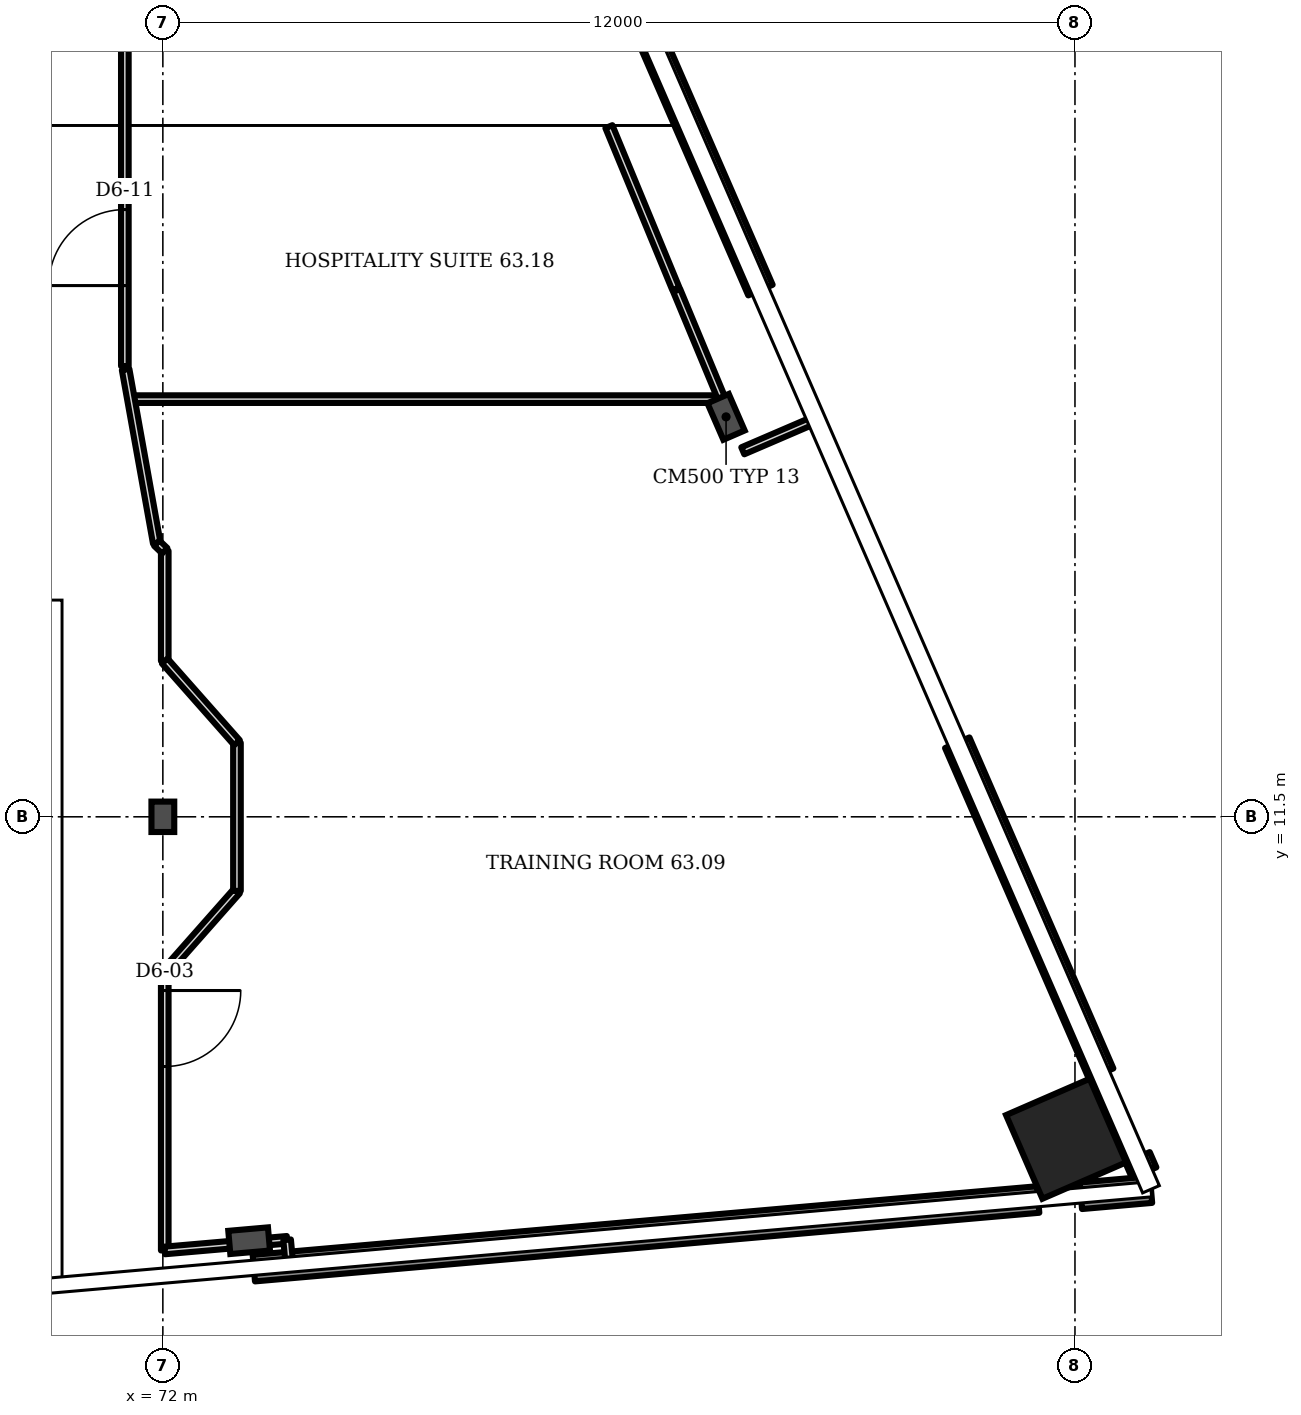
"""IFC4 building model, lengths in metres.
Left out: names, types, materials, properties, quantities, classifications, styles, units other than length and angle.
Written with IfcOpenShell. Run it as: python <this file> out.ifc"""

import sys

from ifc_helpers import new_model, si_unit, direction, frame, frame_2d, origin, origin_2d, place, context, subcontext, project, spatial, rectangle, i_section, extrude, element, fill, save


model = new_model("IFC4")
c1 = context("Model", 3, precision=1e-05, world=origin(), true_north=direction((0.0, 1.0)))
c2 = subcontext(c1, "Body", "Model", "MODEL_VIEW")
j1 = project(units=[si_unit("LENGTHUNIT", "METRE"), si_unit("PLANEANGLEUNIT", "RADIAN")], contexts=[c1])
p1 = place(None, origin())
s1 = spatial("IfcSite", under=j1, at=p1, CompositionType="ELEMENT")
p2 = place(p1, origin())
s2 = spatial("IfcBuilding", under=s1, at=p2, CompositionType="ELEMENT")
p3 = place(p2, frame((0.0, 0.0, 250.3)))
s3 = spatial("IfcBuildingStorey", under=s2, at=p3, CompositionType="ELEMENT", Elevation=250.3)
p4 = place(p3, frame((83.883, 7.265, 0.0), z_axis=(0.0, 0.0, 1.0), x_axis=(-0.398727, 0.917072, 0.0)))
e1 = element("IfcColumn", 1, at=p4, inside=s3, PredefinedType="COLUMN", context=c2, shape_type="SweptSolid", body=[
    extrude(rectangle(XDim=1.2, YDim=1.2, at=origin_2d()), origin(), (0.0, 0.0, 1.0), 3.6),
])
for number, where, z_axis, x_axis in (
    (2, (73.135, 5.923, 0.0), (0.0, 0.0, 1.0), (0.087, -0.996, 0.0)),
    (3, (79.41, 16.762, 0.0), (0.0, 0.0, 1.0), (0.917, 0.399, 0.0)),
):
    element("IfcColumn", number, at=place(p3, frame(where, z_axis=z_axis, x_axis=x_axis)), inside=s3, PredefinedType="COLUMN", context=c2, shape_type="SweptSolid", body=[
        extrude(i_section(OverallWidth=0.306, OverallDepth=0.524, WebThickness=0.021, FlangeThickness=0.04, FilletRadius=0.027, at=origin_2d()), origin(), (0.0, 0.0, 1.0), 3.6),
    ])
p5 = place(p3, frame((72.0, 11.5, 0.0), z_axis=(0.0, 0.0, 1.0), x_axis=(1.0, 0.0, 0.0)))
e4 = element("IfcColumn", 4, at=p5, inside=s3, PredefinedType="COLUMN", context=c2, shape_type="SweptSolid", body=[
    extrude(i_section(OverallWidth=0.3, OverallDepth=0.4, WebThickness=0.013, FlangeThickness=0.024, FilletRadius=0.027, at=origin_2d()), origin(), (0.0, 0.0, 1.0), 3.6),
])
p6 = place(p3, frame((73.197, 5.562, 0.0), z_axis=(0.0, 0.0, 1.0), x_axis=(0.996198, 0.087163, 0.0)))
e5 = element("IfcWall", 5, at=p6, inside=s3, PredefinedType="SOLIDWALL", context=c2, shape_type="SweptSolid", body=[
    extrude(rectangle(XDim=10.358, YDim=0.35, at=frame_2d((5.179, 0.0))), origin(), (0.0, 0.0, 1.0), 1.0),
])
p7 = place(p3, frame((84.078, 6.514, 0.0), z_axis=(0.0, 0.0, 1.0), x_axis=(0.996213, 0.086971, 0.0)))
e6 = element("IfcWall", 6, at=p7, inside=s3, PredefinedType="SOLIDWALL", context=c2, shape_type="SweptSolid", body=[
    extrude(rectangle(XDim=0.926, YDim=0.35, at=frame_2d((0.463, 0.0))), origin(), (0.0, 0.0, 1.0), 1.0),
])
p8 = place(p3, frame((84.91, 6.819, 0.0), z_axis=(0.0, 0.0, 1.0), x_axis=(-0.398359, 0.91723, 0.0)))
e7 = element("IfcWall", 7, at=p8, inside=s3, PredefinedType="SOLIDWALL", context=c2, shape_type="SweptSolid", body=[
    extrude(rectangle(XDim=0.219, YDim=0.35, at=frame_2d((0.109, 0.0))), origin(), (0.0, 0.0, 1.0), 1.0),
])
p9 = place(p3, frame((84.345, 8.12, 0.0), z_axis=(0.0, 0.0, 1.0), x_axis=(-0.398736, 0.917067, 0.0)))
e8 = element("IfcWall", 8, at=p9, inside=s3, PredefinedType="SOLIDWALL", context=c2, shape_type="SweptSolid", body=[
    extrude(rectangle(XDim=4.748, YDim=0.35, at=frame_2d((2.374, 0.0))), origin(), (0.0, 0.0, 1.0), 1.0),
])
p10 = place(p3, frame((79.862, 18.429, 0.0), z_axis=(0.0, 0.0, 1.0), x_axis=(-0.398755, 0.91706, 0.0)))
e9 = element("IfcWall", 9, at=p10, inside=s3, PredefinedType="SOLIDWALL", context=c2, shape_type="SweptSolid", body=[
    extrude(rectangle(XDim=6.374, YDim=0.35, at=frame_2d((3.187, 0.0))), origin(), (0.0, 0.0, 1.0), 1.0),
])
p11 = place(p3, frame((71.5, 17.43, 0.0), z_axis=(0.0, 0.0, 1.0), x_axis=(0.0, 1.0, 0.0)))
e10 = element("IfcWall", 10, at=p11, inside=s3, PredefinedType="PARTITIONING", context=c2, shape_type="SweptSolid", body=[
    extrude(rectangle(XDim=4.345, YDim=0.1, at=frame_2d((2.172, 0.0))), origin(), (0.0, 0.0, 1.0), 3.2),
])
p12 = place(p11, frame((1.059, 0.0, 0.0)))
e11 = element("IfcOpeningElement", 11, at=p12, cuts=e10, PredefinedType="OPENING", context=c2, shape_type="SweptSolid", body=[
    extrude(rectangle(XDim=1.0, YDim=2.1, at=frame_2d((0.5, 1.05))), frame((0.0, 0.06, 0.0), z_axis=(0.0, -1.0, 0.0), x_axis=(1.0, 0.0, 0.0)), (0.0, 0.0, 1.0), 0.12),
])
p13 = place(p3, frame((71.58, 16.995, 0.0), z_axis=(0.0, 0.0, 1.0), x_axis=(1.0, 0.0, 0.0)))
e12 = element("IfcWall", 12, at=p13, inside=s3, PredefinedType="PARTITIONING", context=c2, shape_type="SweptSolid", body=[
    extrude(rectangle(XDim=7.765, YDim=0.1, at=frame_2d((3.882, 0.0))), origin(), (0.0, 0.0, 1.0), 3.2),
])
p14 = place(p3, frame((71.92, 15.1, 0.0), z_axis=(0.0, 0.0, 1.0), x_axis=(-0.176581, 0.984289, 0.0)))
e13 = element("IfcWall", 13, at=p14, inside=s3, PredefinedType="PARTITIONING", context=c2, shape_type="SweptSolid", body=[
    extrude(rectangle(XDim=2.321, YDim=0.1, at=frame_2d((1.161, 0.0))), origin(), (0.0, 0.0, 1.0), 3.2),
])
p15 = place(p3, frame((72.025, 5.795, 0.0), z_axis=(0.0, 0.0, 1.0), x_axis=(0.0, 1.0, 0.0)))
e14 = element("IfcWall", 14, at=p15, inside=s3, PredefinedType="PARTITIONING", context=c2, shape_type="SweptSolid", body=[
    extrude(rectangle(XDim=3.655, YDim=0.1, at=frame_2d((1.828, 0.0))), origin(), (0.0, 0.0, 1.0), 3.2),
])
p16 = place(p15, frame((2.42, 0.0, 0.0)))
e15 = element("IfcOpeningElement", 15, at=p16, cuts=e14, PredefinedType="OPENING", context=c2, shape_type="SweptSolid", body=[
    extrude(rectangle(XDim=1.0, YDim=2.1, at=frame_2d((0.5, 1.05))), frame((0.0, 0.06, 0.0), z_axis=(0.0, -1.0, 0.0), x_axis=(1.0, 0.0, 0.0)), (0.0, 0.0, 1.0), 0.12),
])
p17 = place(p3, frame((72.025, 13.55, 0.0), z_axis=(0.0, 0.0, 1.0), x_axis=(0.0, 1.0, 0.0)))
e16 = element("IfcWall", 16, at=p17, inside=s3, PredefinedType="PARTITIONING", context=c2, shape_type="SweptSolid", body=[
    extrude(rectangle(XDim=1.45, YDim=0.1, at=frame_2d((0.725, 0.0))), origin(), (0.0, 0.0, 1.0), 3.2),
])
p18 = place(p3, frame((72.025, 15.0, 0.0), z_axis=(0.0, 0.0, 1.0), x_axis=(-0.723734, 0.690072, 0.0)))
e17 = element("IfcWall", 17, at=p18, inside=s3, PredefinedType="PARTITIONING", context=c2, shape_type="SweptSolid", body=[
    extrude(rectangle(XDim=0.145, YDim=0.1, at=frame_2d((0.073, 0.0))), origin(), (0.0, 0.0, 1.0), 3.2),
])
p19 = place(p3, frame((72.025, 5.795, 0.0), z_axis=(0.0, 0.0, 1.0), x_axis=(0.996236, 0.086708, 0.0)))
e18 = element("IfcWall", 18, at=p19, inside=s3, PredefinedType="PARTITIONING", context=c2, shape_type="SweptSolid", body=[
    extrude(rectangle(XDim=1.616, YDim=0.1, at=frame_2d((0.808, 0.0))), origin(), (0.0, 0.0, 1.0), 2.58),
])
p20 = place(p3, frame((72.025, 9.45, 0.0), z_axis=(0.0, 0.0, 1.0), x_axis=(0.662295, 0.749251, 0.0)))
e19 = element("IfcWall", 19, at=p20, inside=s3, PredefinedType="PARTITIONING", context=c2, shape_type="SweptSolid", body=[
    extrude(rectangle(XDim=1.435, YDim=0.1, at=frame_2d((0.717, 0.0))), origin(), (0.0, 0.0, 1.0), 3.2),
])
p21 = place(p3, frame((72.975, 10.525, 0.0), z_axis=(0.0, 0.0, 1.0), x_axis=(0.0, 1.0, 0.0)))
e20 = element("IfcWall", 20, at=p21, inside=s3, PredefinedType="PARTITIONING", context=c2, shape_type="SweptSolid", body=[
    extrude(rectangle(XDim=1.95, YDim=0.1, at=frame_2d((0.975, 0.0))), origin(), (0.0, 0.0, 1.0), 3.2),
])
p22 = place(p3, frame((72.975, 12.475, 0.0), z_axis=(0.0, 0.0, 1.0), x_axis=(-0.662295, 0.749251, 0.0)))
e21 = element("IfcWall", 21, at=p22, inside=s3, PredefinedType="PARTITIONING", context=c2, shape_type="SweptSolid", body=[
    extrude(rectangle(XDim=1.435, YDim=0.1, at=frame_2d((0.717, 0.0))), origin(), (0.0, 0.0, 1.0), 3.2),
])
p23 = place(p3, frame((73.663, 5.628, 0.0), z_axis=(0.0, 0.0, 1.0), x_axis=(-0.091893, 0.995772, 0.0)))
e22 = element("IfcWall", 22, at=p23, inside=s3, PredefinedType="PARTITIONING", context=c2, shape_type="SweptSolid", body=[
    extrude(rectangle(XDim=0.308, YDim=0.1, at=frame_2d((0.154, 0.0))), origin(), (0.0, 0.0, 1.0), 3.2),
])
p24 = place(p3, frame((78.75, 18.445, 0.0), z_axis=(0.0, 0.0, 1.0), x_axis=(-0.381663, 0.924299, 0.0)))
e23 = element("IfcWall", 23, at=p24, inside=s3, PredefinedType="PARTITIONING", context=c2, shape_type="SweptSolid", body=[
    extrude(rectangle(XDim=2.31, YDim=0.1, at=frame_2d((1.155, 0.0))), origin(), (0.0, 0.0, 1.0), 3.2),
])
p25 = place(p3, frame((79.35, 17.005, 0.0), z_axis=(0.0, 0.0, 1.0), x_axis=(-0.383703, 0.923459, 0.0)))
e24 = element("IfcWall", 24, at=p25, inside=s3, PredefinedType="PARTITIONING", context=c2, shape_type="SweptSolid", body=[
    extrude(rectangle(XDim=1.538, YDim=0.1, at=frame_2d((0.769, 0.0))), origin(), (0.0, 0.0, 1.0), 3.2),
])
p26 = place(p3, frame((79.63, 16.315, 0.0), z_axis=(0.0, 0.0, 1.0), x_axis=(0.918616, 0.395147, 0.0)))
e25 = element("IfcWall", 25, at=p26, inside=s3, PredefinedType="PARTITIONING", context=c2, shape_type="SweptSolid", body=[
    extrude(rectangle(XDim=1.031, YDim=0.1, at=frame_2d((0.516, 0.0))), origin(), (0.0, 0.0, 1.0), 2.58),
])
p27 = place(p16, origin())
e26 = element("IfcDoor", 26, at=p27, inside=s3, OperationType="SINGLE_SWING_RIGHT", PredefinedType="DOOR", context=c2, shape_type="SweptSolid", body=[
    extrude(rectangle(XDim=1.0, YDim=2.1, at=frame_2d((0.5, 1.05))), frame((0.0, 0.025, 0.0), z_axis=(0.0, -1.0, 0.0), x_axis=(1.0, 0.0, 0.0)), (0.0, 0.0, 1.0), 0.05),
])
fill(e15, e26)
p28 = place(p12, origin())
e27 = element("IfcDoor", 27, at=p28, inside=s3, OperationType="SINGLE_SWING_LEFT", PredefinedType="DOOR", context=c2, shape_type="SweptSolid", body=[
    extrude(rectangle(XDim=1.0, YDim=2.1, at=frame_2d((0.5, 1.05))), frame((0.0, 0.025, 0.0), z_axis=(0.0, -1.0, 0.0), x_axis=(1.0, 0.0, 0.0)), (0.0, 0.0, 1.0), 0.05),
])
fill(e11, e27)
save(model, sys.argv[1])
